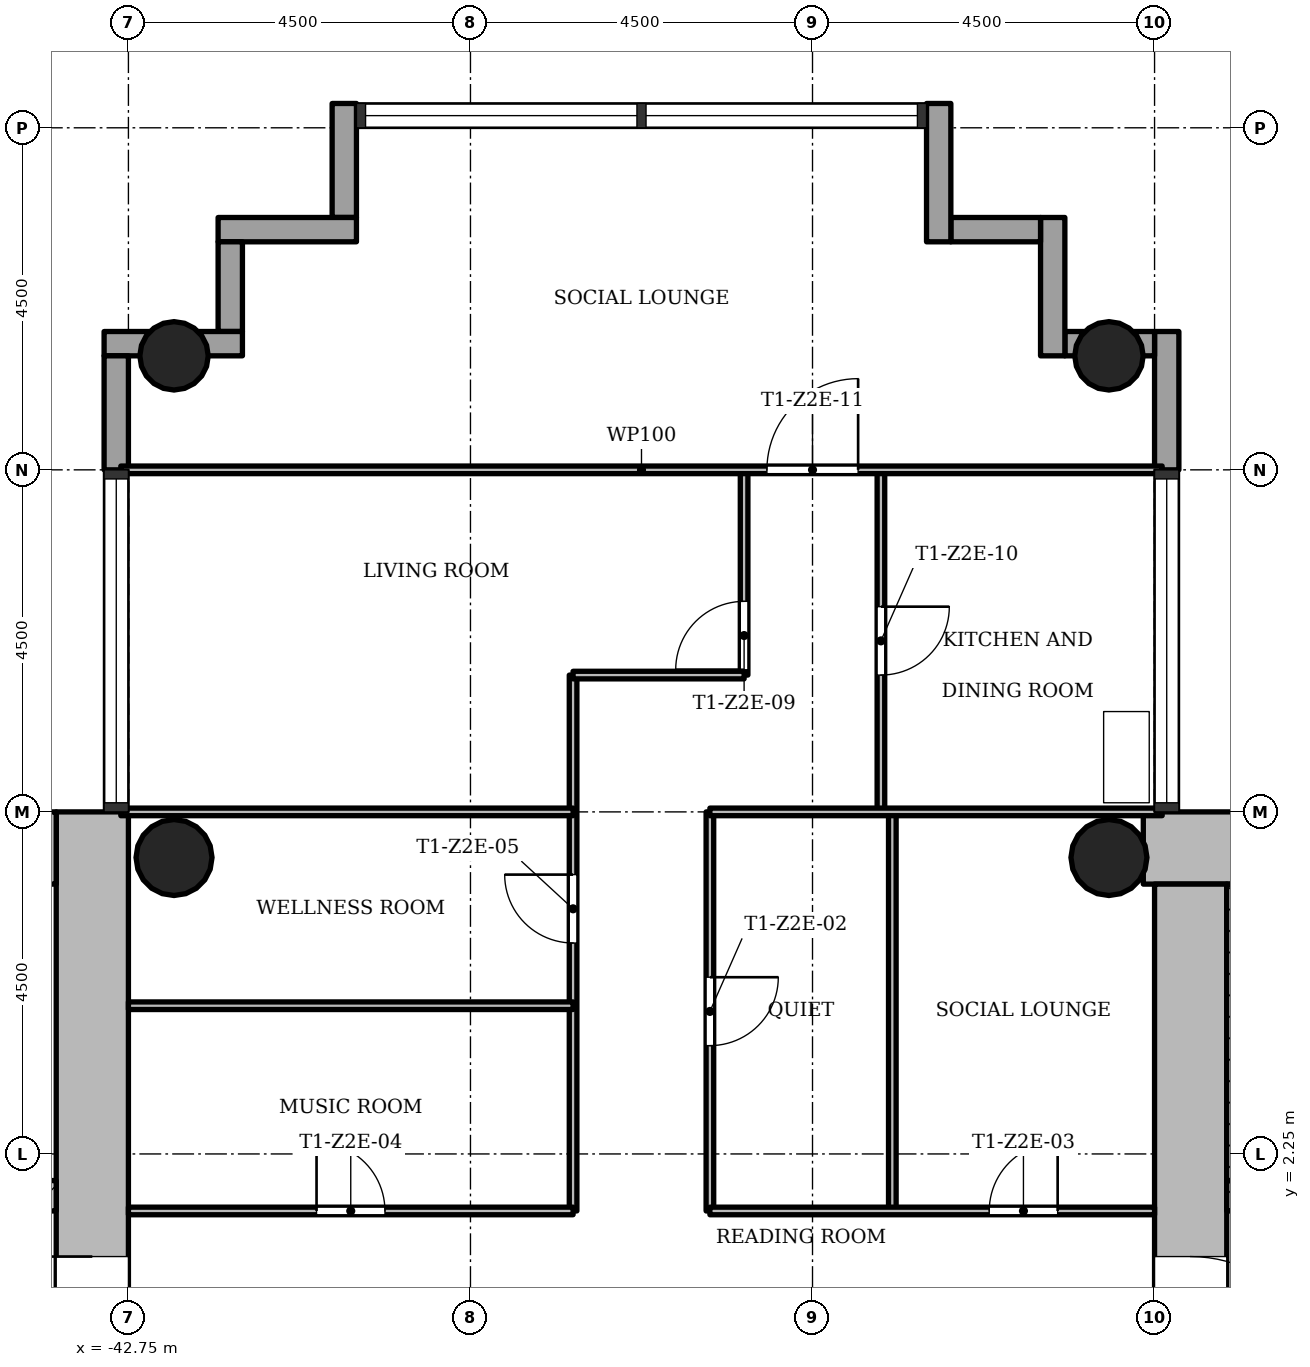
"""IFC4 building model, lengths in metres.
Left out: names, types, materials, properties, quantities, classifications, styles, units other than length and angle.
Written with IfcOpenShell. Run it as: python <this file> out.ifc"""

import sys

from ifc_helpers import new_model, si_unit, direction, frame, frame_2d, origin, origin_2d, place, context, subcontext, project, spatial, rectangle, hollow_circle, extrude, element, fill, save


model = new_model("IFC4")
c1 = context("Model", 3, precision=1e-05, world=origin(), true_north=direction((0.0, 1.0)))
c2 = subcontext(c1, "Body", "Model", "MODEL_VIEW")
j1 = project(units=[si_unit("LENGTHUNIT", "METRE"), si_unit("PLANEANGLEUNIT", "RADIAN")], contexts=[c1])
p1 = place(None, origin())
s1 = spatial("IfcSite", under=j1, at=p1, CompositionType="ELEMENT")
p2 = place(p1, origin())
s2 = spatial("IfcBuilding", under=s1, at=p2, CompositionType="ELEMENT")
p3 = place(p2, frame((0.0, 0.0, 97.0)))
s3 = spatial("IfcBuildingStorey", under=s2, at=p3, CompositionType="ELEMENT", Elevation=97.0)
p4 = place(p3, frame((-20.702, 6.275, 0.0), z_axis=(0.0, 0.0, 1.0), x_axis=(-1.0, 0.0, 0.0)))
e1 = element("IfcWall", 1, at=p4, inside=s3, PredefinedType="SHEAR", context=c2, shape_type="SweptSolid", body=[
    extrude(rectangle(XDim=8.696, YDim=0.95, at=frame_2d((4.348, 0.0))), origin(), (0.0, 0.0, 1.0), 3.4),
])
p5 = place(p3, frame((-28.775, 5.8, 0.0), z_axis=(0.0, 0.0, 1.0), x_axis=(0.0, -1.0, 0.0)))
e2 = element("IfcWall", 2, at=p5, inside=s3, PredefinedType="SHEAR", context=c2, shape_type="SweptSolid", body=[
    extrude(rectangle(XDim=12.55, YDim=0.95, at=frame_2d((6.275, 0.0))), origin(), (0.0, 0.0, 1.0), 3.4),
])
p6 = place(p5, frame((4.9, 0.0, 0.0)))
e3 = element("IfcOpeningElement", 3, at=p6, cuts=e2, PredefinedType="OPENING", context=c2, shape_type="SweptSolid", body=[
    extrude(rectangle(XDim=1.8, YDim=2.1, at=frame_2d((0.9, 1.05))), frame((0.0, 0.485, 0.0), z_axis=(0.0, -1.0, 0.0), x_axis=(1.0, 0.0, 0.0)), (0.0, 0.0, 1.0), 0.97),
])
p7 = place(p3, frame((-28.3, 1.7, 0.0), z_axis=(0.0, 0.0, 1.0), x_axis=(1.0, 0.0, 0.0)))
e4 = element("IfcWall", 4, at=p7, inside=s3, PredefinedType="SHEAR", context=c2, shape_type="SweptSolid", body=[
    extrude(rectangle(XDim=7.1, YDim=0.4, at=frame_2d((3.55, 0.0))), origin(), (0.0, 0.0, 1.0), 3.4),
])
p8 = place(p7, frame((0.7, 0.0, 0.0)))
e5 = element("IfcOpeningElement", 5, at=p8, cuts=e4, PredefinedType="OPENING", context=c2, shape_type="SweptSolid", body=[
    extrude(rectangle(XDim=0.9, YDim=2.1, at=frame_2d((0.45, 1.05))), frame((0.0, 0.21, 0.0), z_axis=(0.0, -1.0, 0.0), x_axis=(1.0, 0.0, 0.0)), (0.0, 0.0, 1.0), 0.42),
])
p9 = place(p3, frame((-43.225, -5.8, 0.0), z_axis=(0.0, 0.0, 1.0), x_axis=(0.0, 1.0, 0.0)))
e6 = element("IfcWall", 6, at=p9, inside=s3, PredefinedType="SHEAR", context=c2, shape_type="SweptSolid", body=[
    extrude(rectangle(XDim=12.55, YDim=0.95, at=frame_2d((6.275, 0.0))), origin(), (0.0, 0.0, 1.0), 3.4),
])
p10 = place(p9, frame((4.9, 0.0, 0.0)))
e7 = element("IfcOpeningElement", 7, at=p10, cuts=e6, PredefinedType="OPENING", context=c2, shape_type="SweptSolid", body=[
    extrude(rectangle(XDim=1.8, YDim=2.1, at=frame_2d((0.9, 1.05))), frame((0.0, 0.485, 0.0), z_axis=(0.0, -1.0, 0.0), x_axis=(1.0, 0.0, 0.0)), (0.0, 0.0, 1.0), 0.97),
])
p11 = place(p3, frame((-43.7, 6.275, 0.0), z_axis=(0.0, 0.0, 1.0), x_axis=(-1.0, 0.0, 0.0)))
e8 = element("IfcWall", 8, at=p11, inside=s3, PredefinedType="SHEAR", context=c2, shape_type="SweptSolid", body=[
    extrude(rectangle(XDim=8.05, YDim=0.95, at=frame_2d((4.025, 0.0))), origin(), (0.0, 0.0, 1.0), 3.4),
])
p12 = place(p3, frame((-50.8, 1.7, 0.0), z_axis=(0.0, 0.0, 1.0), x_axis=(1.0, 0.0, 0.0)))
e9 = element("IfcWall", 9, at=p12, inside=s3, PredefinedType="SHEAR", context=c2, shape_type="SweptSolid", body=[
    extrude(rectangle(XDim=7.1, YDim=0.4, at=frame_2d((3.55, 0.0))), origin(), (0.0, 0.0, 1.0), 3.4),
])
p13 = place(p12, frame((5.2, 0.0, 0.0)))
e10 = element("IfcOpeningElement", 10, at=p13, cuts=e9, PredefinedType="OPENING", context=c2, shape_type="SweptSolid", body=[
    extrude(rectangle(XDim=1.1, YDim=2.1, at=frame_2d((0.55, 1.05))), frame((0.0, 0.21, 0.0), z_axis=(0.0, -1.0, 0.0), x_axis=(1.0, 0.0, 0.0)), (0.0, 0.0, 1.0), 0.42),
])
for number, where, z_axis, x_axis in (
    (11, (-29.85, 12.75, 0.0), (0.0, 0.0, 1.0), (1.0, 0.0, 0.0)),
    (12, (-42.15, 12.75, 0.0), (0.0, 0.0, 1.0), (1.0, 0.0, 0.0)),
):
    element("IfcColumn", number, at=place(p3, frame(where, z_axis=z_axis, x_axis=x_axis)), inside=s3, PredefinedType="COLUMN", context=c2, shape_type="SweptSolid", body=[
        extrude(hollow_circle(Radius=0.45, WallThickness=0.032, at=origin_2d()), origin(), (0.0, 0.0, 1.0), 3.4),
    ])
for number, where, z_axis, x_axis in (
    (13, (-29.85, 6.15, 0.0), (0.0, 0.0, 1.0), (1.0, 0.0, 0.0)),
    (14, (-42.15, 6.15, 0.0), (0.0, 0.0, 1.0), (1.0, 0.0, 0.0)),
):
    element("IfcColumn", number, at=place(p3, frame(where, z_axis=z_axis, x_axis=x_axis)), inside=s3, PredefinedType="COLUMN", context=c2, shape_type="SweptSolid", body=[
        extrude(hollow_circle(Radius=0.5, WallThickness=0.036, at=origin_2d()), origin(), (0.0, 0.0, 1.0), 3.4),
    ])
p14 = place(p3, frame((-29.09, 11.25, -0.3), z_axis=(0.0, 0.0, 1.0), x_axis=(0.0, 1.0, 0.0)))
e15 = element("IfcWall", 15, at=p14, inside=s3, PredefinedType="STANDARD", context=c2, shape_type="SweptSolid", body=[
    extrude(rectangle(XDim=1.82, YDim=0.32, at=frame_2d((0.91, 0.0))), origin(), (0.0, 0.0, 1.0), 3.4),
])
p15 = place(p3, frame((-29.25, 12.91, -0.3), z_axis=(0.0, 0.0, 1.0), x_axis=(-1.0, 0.0, 0.0)))
e16 = element("IfcWall", 16, at=p15, inside=s3, PredefinedType="STANDARD", context=c2, shape_type="SweptSolid", body=[
    extrude(rectangle(XDim=1.18, YDim=0.32, at=frame_2d((0.59, 0.0))), origin(), (0.0, 0.0, 1.0), 3.4),
])
p16 = place(p3, frame((-30.59, 12.75, -0.3), z_axis=(0.0, 0.0, 1.0), x_axis=(0.0, 1.0, 0.0)))
e17 = element("IfcWall", 17, at=p16, inside=s3, PredefinedType="STANDARD", context=c2, shape_type="SweptSolid", body=[
    extrude(rectangle(XDim=1.82, YDim=0.32, at=frame_2d((0.91, 0.0))), origin(), (0.0, 0.0, 1.0), 3.4),
])
p17 = place(p3, frame((-30.75, 14.41, -0.3), z_axis=(0.0, 0.0, 1.0), x_axis=(-1.0, 0.0, 0.0)))
e18 = element("IfcWall", 18, at=p17, inside=s3, PredefinedType="STANDARD", context=c2, shape_type="SweptSolid", body=[
    extrude(rectangle(XDim=1.18, YDim=0.32, at=frame_2d((0.59, 0.0))), origin(), (0.0, 0.0, 1.0), 3.4),
])
p18 = place(p3, frame((-32.09, 14.25, -0.3), z_axis=(0.0, 0.0, 1.0), x_axis=(0.0, 1.0, 0.0)))
e19 = element("IfcWall", 19, at=p18, inside=s3, PredefinedType="STANDARD", context=c2, shape_type="SweptSolid", body=[
    extrude(rectangle(XDim=1.82, YDim=0.32, at=frame_2d((0.91, 0.0))), origin(), (0.0, 0.0, 1.0), 3.4),
])
p19 = place(p3, frame((-39.91, 16.07, -0.3), z_axis=(0.0, 0.0, 1.0), x_axis=(0.0, -1.0, 0.0)))
e20 = element("IfcWall", 20, at=p19, inside=s3, PredefinedType="STANDARD", context=c2, shape_type="SweptSolid", body=[
    extrude(rectangle(XDim=1.5, YDim=0.32, at=frame_2d((0.75, 0.0))), origin(), (0.0, 0.0, 1.0), 3.4),
])
p20 = place(p3, frame((-39.75, 14.41, -0.3), z_axis=(0.0, 0.0, 1.0), x_axis=(-1.0, 0.0, 0.0)))
e21 = element("IfcWall", 21, at=p20, inside=s3, PredefinedType="STANDARD", context=c2, shape_type="SweptSolid", body=[
    extrude(rectangle(XDim=1.82, YDim=0.32, at=frame_2d((0.91, 0.0))), origin(), (0.0, 0.0, 1.0), 3.4),
])
p21 = place(p3, frame((-41.41, 14.25, -0.3), z_axis=(0.0, 0.0, 1.0), x_axis=(0.0, -1.0, 0.0)))
e22 = element("IfcWall", 22, at=p21, inside=s3, PredefinedType="STANDARD", context=c2, shape_type="SweptSolid", body=[
    extrude(rectangle(XDim=1.18, YDim=0.32, at=frame_2d((0.59, 0.0))), origin(), (0.0, 0.0, 1.0), 3.4),
])
p22 = place(p3, frame((-41.25, 12.91, -0.3), z_axis=(0.0, 0.0, 1.0), x_axis=(-1.0, 0.0, 0.0)))
e23 = element("IfcWall", 23, at=p22, inside=s3, PredefinedType="STANDARD", context=c2, shape_type="SweptSolid", body=[
    extrude(rectangle(XDim=1.82, YDim=0.32, at=frame_2d((0.91, 0.0))), origin(), (0.0, 0.0, 1.0), 3.4),
])
p23 = place(p3, frame((-42.91, 12.75, -0.3), z_axis=(0.0, 0.0, 1.0), x_axis=(0.0, -1.0, 0.0)))
e24 = element("IfcWall", 24, at=p23, inside=s3, PredefinedType="STANDARD", context=c2, shape_type="SweptSolid", body=[
    extrude(rectangle(XDim=1.5, YDim=0.32, at=frame_2d((0.75, 0.0))), origin(), (0.0, 0.0, 1.0), 3.4),
])
p24 = place(p3, frame((-36.9, 1.5, 0.0), z_axis=(0.0, 0.0, 1.0), x_axis=(0.0, 1.0, 0.0)))
e25 = element("IfcWall", 25, at=p24, inside=s3, PredefinedType="PARTITIONING", context=c2, shape_type="SweptSolid", body=[
    extrude(rectangle(XDim=7.05, YDim=0.1, at=frame_2d((3.525, 0.0))), origin(), (0.0, 0.0, 1.0), 3.0),
])
p25 = place(p24, frame((3.525, 0.0, 0.0)))
e26 = element("IfcOpeningElement", 26, at=p25, cuts=e25, PredefinedType="OPENING", context=c2, shape_type="SweptSolid", body=[
    extrude(rectangle(XDim=0.9, YDim=2.1, at=frame_2d((0.45, 1.05))), frame((0.0, 0.06, 0.0), z_axis=(0.0, -1.0, 0.0), x_axis=(1.0, 0.0, 0.0)), (0.0, 0.0, 1.0), 0.12),
])
p26 = place(p3, frame((-35.1, 1.5, 0.0), z_axis=(0.0, 0.0, 1.0), x_axis=(0.0, 1.0, 0.0)))
e27 = element("IfcWall", 27, at=p26, inside=s3, PredefinedType="PARTITIONING", context=c2, shape_type="SweptSolid", body=[
    extrude(rectangle(XDim=5.25, YDim=0.1, at=frame_2d((2.625, 0.0))), origin(), (0.0, 0.0, 1.0), 3.0),
])
p27 = place(p26, frame((2.175, 0.0, 0.0)))
e28 = element("IfcOpeningElement", 28, at=p27, cuts=e27, PredefinedType="OPENING", context=c2, shape_type="SweptSolid", body=[
    extrude(rectangle(XDim=0.9, YDim=2.1, at=frame_2d((0.45, 1.05))), frame((0.0, 0.06, 0.0), z_axis=(0.0, -1.0, 0.0), x_axis=(1.0, 0.0, 0.0)), (0.0, 0.0, 1.0), 0.12),
])
p28 = place(p3, frame((-34.65, 8.55, 0.0), z_axis=(0.0, 0.0, 1.0), x_axis=(0.0, 1.0, 0.0)))
e29 = element("IfcWall", 29, at=p28, inside=s3, PredefinedType="PARTITIONING", context=c2, shape_type="SweptSolid", body=[
    extrude(rectangle(XDim=2.7, YDim=0.1, at=frame_2d((1.35, 0.0))), origin(), (0.0, 0.0, 1.0), 3.0),
])
p29 = place(p28, frame((0.07, 0.0, 0.0)))
e30 = element("IfcOpeningElement", 30, at=p29, cuts=e29, PredefinedType="OPENING", context=c2, shape_type="SweptSolid", body=[
    extrude(rectangle(XDim=0.9, YDim=2.1, at=frame_2d((0.45, 1.05))), frame((0.0, 0.06, 0.0), z_axis=(0.0, -1.0, 0.0), x_axis=(1.0, 0.0, 0.0)), (0.0, 0.0, 1.0), 0.12),
])
p30 = place(p3, frame((-32.85, 6.75, 0.0), z_axis=(0.0, 0.0, 1.0), x_axis=(0.0, 1.0, 0.0)))
e31 = element("IfcWall", 31, at=p30, inside=s3, PredefinedType="PARTITIONING", context=c2, shape_type="SweptSolid", body=[
    extrude(rectangle(XDim=4.5, YDim=0.1, at=frame_2d((2.25, 0.0))), origin(), (0.0, 0.0, 1.0), 3.0),
])
p31 = place(p30, frame((1.8, 0.0, 0.0)))
e32 = element("IfcOpeningElement", 32, at=p31, cuts=e31, PredefinedType="OPENING", context=c2, shape_type="SweptSolid", body=[
    extrude(rectangle(XDim=0.9, YDim=2.1, at=frame_2d((0.45, 1.05))), frame((0.0, 0.06, 0.0), z_axis=(0.0, -1.0, 0.0), x_axis=(1.0, 0.0, 0.0)), (0.0, 0.0, 1.0), 0.12),
])
p32 = place(p3, frame((-32.7, 1.5, 0.0), z_axis=(0.0, 0.0, 1.0), x_axis=(0.0, 1.0, 0.0)))
e33 = element("IfcWall", 33, at=p32, inside=s3, PredefinedType="PARTITIONING", context=c2, shape_type="SweptSolid", body=[
    extrude(rectangle(XDim=5.25, YDim=0.1, at=frame_2d((2.625, 0.0))), origin(), (0.0, 0.0, 1.0), 3.0),
])
p33 = place(p3, frame((-42.75, 1.5, 0.0), z_axis=(0.0, 0.0, 1.0), x_axis=(1.0, 0.0, 0.0)))
e34 = element("IfcWall", 34, at=p33, inside=s3, PredefinedType="PARTITIONING", context=c2, shape_type="SweptSolid", body=[
    extrude(rectangle(XDim=5.85, YDim=0.1, at=frame_2d((2.925, 0.0))), origin(), (0.0, 0.0, 1.0), 3.0),
])
p34 = place(p33, frame((2.475, 0.0, 0.0)))
e35 = element("IfcOpeningElement", 35, at=p34, cuts=e34, PredefinedType="OPENING", context=c2, shape_type="SweptSolid", body=[
    extrude(rectangle(XDim=0.9, YDim=2.1, at=frame_2d((0.45, 1.05))), frame((0.0, 0.06, 0.0), z_axis=(0.0, -1.0, 0.0), x_axis=(1.0, 0.0, 0.0)), (0.0, 0.0, 1.0), 0.12),
])
p35 = place(p3, frame((-35.1, 1.5, 0.0), z_axis=(0.0, 0.0, 1.0), x_axis=(1.0, 0.0, 0.0)))
e36 = element("IfcWall", 36, at=p35, inside=s3, PredefinedType="PARTITIONING", context=c2, shape_type="SweptSolid", body=[
    extrude(rectangle(XDim=5.85, YDim=0.1, at=frame_2d((2.925, 0.0))), origin(), (0.0, 0.0, 1.0), 3.0),
])
p36 = place(p35, frame((3.675, 0.0, 0.0)))
e37 = element("IfcOpeningElement", 37, at=p36, cuts=e36, PredefinedType="OPENING", context=c2, shape_type="SweptSolid", body=[
    extrude(rectangle(XDim=0.9, YDim=2.1, at=frame_2d((0.45, 1.05))), frame((0.0, 0.06, 0.0), z_axis=(0.0, -1.0, 0.0), x_axis=(1.0, 0.0, 0.0)), (0.0, 0.0, 1.0), 0.12),
])
p37 = place(p3, frame((-42.75, 4.2, 0.0), z_axis=(0.0, 0.0, 1.0), x_axis=(1.0, 0.0, 0.0)))
e38 = element("IfcWall", 38, at=p37, inside=s3, PredefinedType="PARTITIONING", context=c2, shape_type="SweptSolid", body=[
    extrude(rectangle(XDim=5.85, YDim=0.1, at=frame_2d((2.925, 0.0))), origin(), (0.0, 0.0, 1.0), 3.0),
])
for number, where, z_axis, x_axis in (
    (39, (-42.85, 6.75, 0.0), (0.0, 0.0, 1.0), (1.0, 0.0, 0.0)),
    (40, (-35.1, 6.75, 0.0), (0.0, 0.0, 1.0), (1.0, 0.0, 0.0)),
):
    element("IfcWall", number, at=place(p3, frame(where, z_axis=z_axis, x_axis=x_axis)), inside=s3, PredefinedType="PARTITIONING", context=c2, shape_type="SweptSolid", body=[
        extrude(rectangle(XDim=5.95, YDim=0.1, at=frame_2d((2.975, 0.0))), origin(), (0.0, 0.0, 1.0), 3.0),
    ])
p38 = place(p3, frame((-36.9, 8.55, 0.0), z_axis=(0.0, 0.0, 1.0), x_axis=(1.0, 0.0, 0.0)))
e41 = element("IfcWall", 41, at=p38, inside=s3, PredefinedType="PARTITIONING", context=c2, shape_type="SweptSolid", body=[
    extrude(rectangle(XDim=2.25, YDim=0.1, at=frame_2d((1.125, 0.0))), origin(), (0.0, 0.0, 1.0), 3.0),
])
p39 = place(p3, frame((-42.85, 11.25, 0.0), z_axis=(0.0, 0.0, 1.0), x_axis=(1.0, 0.0, 0.0)))
e42 = element("IfcWall", 42, at=p39, inside=s3, PredefinedType="PARTITIONING", context=c2, shape_type="SweptSolid", body=[
    extrude(rectangle(XDim=13.7, YDim=0.1, at=frame_2d((6.85, 0.0))), origin(), (0.0, 0.0, 1.0), 3.0),
])
p40 = place(p39, frame((8.5, 0.0, 0.0)))
e43 = element("IfcOpeningElement", 43, at=p40, cuts=e42, PredefinedType="OPENING", context=c2, shape_type="SweptSolid", body=[
    extrude(rectangle(XDim=1.2, YDim=2.1, at=frame_2d((0.6, 1.05))), frame((0.0, 0.06, 0.0), z_axis=(0.0, -1.0, 0.0), x_axis=(1.0, 0.0, 0.0)), (0.0, 0.0, 1.0), 0.12),
])
p41 = place(p3, frame((-28.175, 1.9, 0.0), z_axis=(0.0, 0.0, 1.0), x_axis=(0.0, 1.0, 0.0)))
e44 = element("IfcWall", 44, at=p41, inside=s3, PredefinedType="SHEAR", context=c2, shape_type="SweptSolid", body=[
    extrude(rectangle(XDim=3.9, YDim=0.25, at=frame_2d((1.95, 0.0))), origin(), (0.0, 0.0, 1.0), 3.4),
])
p42 = place(p27, origin())
e45 = element("IfcDoor", 45, at=p42, inside=s3, OperationType="SINGLE_SWING_RIGHT", PredefinedType="DOOR", context=c2, shape_type="SweptSolid", body=[
    extrude(rectangle(XDim=0.9, YDim=2.1, at=frame_2d((0.45, 1.05))), frame((0.0, 0.025, 0.0), z_axis=(0.0, -1.0, 0.0), x_axis=(1.0, 0.0, 0.0)), (0.0, 0.0, 1.0), 0.05),
])
fill(e28, e45)
p43 = place(p36, origin())
e46 = element("IfcDoor", 46, at=p43, inside=s3, OperationType="SINGLE_SWING_LEFT", PredefinedType="DOOR", context=c2, shape_type="SweptSolid", body=[
    extrude(rectangle(XDim=0.9, YDim=2.1, at=frame_2d((0.45, 1.05))), frame((0.0, 0.025, 0.0), z_axis=(0.0, -1.0, 0.0), x_axis=(1.0, 0.0, 0.0)), (0.0, 0.0, 1.0), 0.05),
])
fill(e37, e46)
p44 = place(p34, origin())
e47 = element("IfcDoor", 47, at=p44, inside=s3, OperationType="SINGLE_SWING_RIGHT", PredefinedType="DOOR", context=c2, shape_type="SweptSolid", body=[
    extrude(rectangle(XDim=0.9, YDim=2.1, at=frame_2d((0.45, 1.05))), frame((0.0, 0.025, 0.0), z_axis=(0.0, -1.0, 0.0), x_axis=(1.0, 0.0, 0.0)), (0.0, 0.0, 1.0), 0.05),
])
fill(e35, e47)
p45 = place(p25, origin())
e48 = element("IfcDoor", 48, at=p45, inside=s3, OperationType="SINGLE_SWING_LEFT", PredefinedType="DOOR", context=c2, shape_type="SweptSolid", body=[
    extrude(rectangle(XDim=0.9, YDim=2.1, at=frame_2d((0.45, 1.05))), frame((0.0, 0.025, 0.0), z_axis=(0.0, -1.0, 0.0), x_axis=(1.0, 0.0, 0.0)), (0.0, 0.0, 1.0), 0.05),
])
fill(e26, e48)
p46 = place(p29, origin())
e49 = element("IfcDoor", 49, at=p46, inside=s3, OperationType="SINGLE_SWING_RIGHT", PredefinedType="DOOR", context=c2, shape_type="SweptSolid", body=[
    extrude(rectangle(XDim=0.9, YDim=2.1, at=frame_2d((0.45, 1.05))), frame((0.0, 0.025, 0.0), z_axis=(0.0, -1.0, 0.0), x_axis=(1.0, 0.0, 0.0)), (0.0, 0.0, 1.0), 0.05),
])
fill(e30, e49)
p47 = place(p31, origin())
e50 = element("IfcDoor", 50, at=p47, inside=s3, OperationType="SINGLE_SWING_RIGHT", PredefinedType="DOOR", context=c2, shape_type="SweptSolid", body=[
    extrude(rectangle(XDim=0.9, YDim=2.1, at=frame_2d((0.45, 1.05))), frame((0.0, 0.025, 0.0), z_axis=(0.0, -1.0, 0.0), x_axis=(1.0, 0.0, 0.0)), (0.0, 0.0, 1.0), 0.05),
])
fill(e32, e50)
p48 = place(p40, origin())
e51 = element("IfcDoor", 51, at=p48, inside=s3, OperationType="SINGLE_SWING_LEFT", PredefinedType="DOOR", context=c2, shape_type="SweptSolid", body=[
    extrude(rectangle(XDim=1.2, YDim=2.1, at=frame_2d((0.6, 1.05))), frame((0.0, 0.025, 0.0), z_axis=(0.0, -1.0, 0.0), x_axis=(1.0, 0.0, 0.0)), (0.0, 0.0, 1.0), 0.05),
])
fill(e43, e51)
p49 = place(p6, origin())
e52 = element("IfcDoor", 52, at=p49, inside=s3, OperationType="SINGLE_SWING_LEFT", PredefinedType="DOOR", context=c2, shape_type="SweptSolid", body=[
    extrude(rectangle(XDim=1.8, YDim=2.1, at=frame_2d((0.9, 1.05))), frame((0.0, 0.025, 0.0), z_axis=(0.0, -1.0, 0.0), x_axis=(1.0, 0.0, 0.0)), (0.0, 0.0, 1.0), 0.05),
])
fill(e3, e52)
p50 = place(p10, origin())
e53 = element("IfcDoor", 53, at=p50, inside=s3, OperationType="SINGLE_SWING_LEFT", PredefinedType="DOOR", context=c2, shape_type="SweptSolid", body=[
    extrude(rectangle(XDim=1.8, YDim=2.1, at=frame_2d((0.9, 1.05))), frame((0.0, 0.025, 0.0), z_axis=(0.0, -1.0, 0.0), x_axis=(1.0, 0.0, 0.0)), (0.0, 0.0, 1.0), 0.05),
])
fill(e7, e53)
save(model, sys.argv[1])
